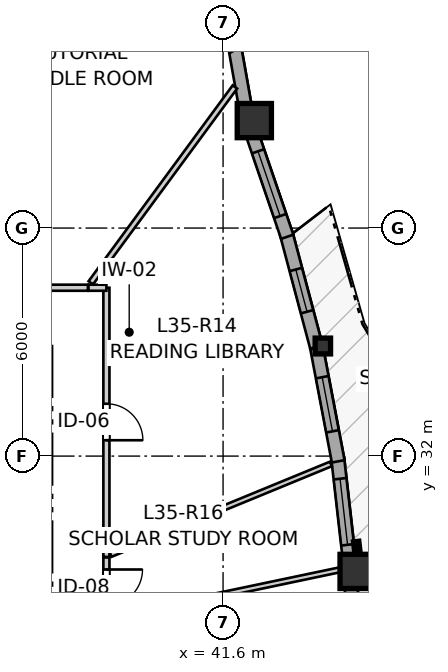
"""IFC4 building model, lengths in metres.
Left out: names, types, materials, properties, quantities, classifications, styles, units other than length and angle.
Written with IfcOpenShell. Run it as: python <this file> out.ifc"""

import sys

from ifc_helpers import new_model, si_unit, direction, frame, frame_2d, origin, origin_2d, place, context, subcontext, project, spatial, rectangle, i_section, extrude, source, transform, mapped, element, fill, save


model = new_model("IFC4")
c1 = context("Model", 3, precision=1e-05, world=origin(), true_north=direction((0.0, 1.0)))
c2 = subcontext(c1, "Body", "Model", "MODEL_VIEW")
j1 = project(units=[si_unit("LENGTHUNIT", "METRE"), si_unit("PLANEANGLEUNIT", "RADIAN")], contexts=[c1])
p1 = place(None, origin())
s1 = spatial("IfcSite", under=j1, at=p1, CompositionType="ELEMENT")
p2 = place(p1, origin())
s2 = spatial("IfcBuilding", under=s1, at=p2, CompositionType="ELEMENT")
p3 = place(p2, frame((0.0, 0.0, 118.4)))
s3 = spatial("IfcBuildingStorey", under=s2, at=p3, CompositionType="ELEMENT", Elevation=118.4)
m1 = source(origin(), c2, "Body", "SweptSolid", [
    extrude(rectangle(XDim=0.9, YDim=0.9, at=origin_2d()), origin(), (0.0, 0.0, 1.0), 2.95),
])
p4 = place(p3, frame((45.127, 28.966, 0.0), z_axis=(0.0, 0.0, 1.0), x_axis=(1.0, 0.0, 0.0)))
e1 = element("IfcColumn", 1, at=p4, inside=s3, PredefinedType="COLUMN", context=c2, shape_type="MappedRepresentation", body=[
    mapped(m1, transform((0.0, 0.0, 0.0), x_axis=(1.0, 0.0, 0.0), y_axis=(0.0, 1.0, 0.0), z_axis=(0.0, 0.0, 1.0), scale=1.0)),
])
m2 = source(origin(), c2, "Body", "SweptSolid", [
    extrude(i_section(OverallWidth=0.406, OverallDepth=0.416, WebThickness=0.027, FlangeThickness=0.044, FilletRadius=0.015, at=origin_2d()), origin(), (0.0, 0.0, 1.0), 2.95),
])
p5 = place(p3, frame((44.226, 34.896, 0.0), z_axis=(0.0, 0.0, 1.0), x_axis=(1.0, 0.0, 0.0)))
e2 = element("IfcColumn", 2, at=p5, inside=s3, PredefinedType="PILASTER", context=c2, shape_type="MappedRepresentation", body=[
    mapped(m2, transform((0.0, 0.0, 0.0), x_axis=(1.0, 0.0, 0.0), y_axis=(0.0, 1.0, 0.0), z_axis=(0.0, 0.0, 1.0), scale=1.0)),
])
p6 = place(p3, frame((42.423, 40.828, 0.0), z_axis=(0.0, 0.0, 1.0), x_axis=(1.0, 0.0, 0.0)))
e3 = element("IfcColumn", 3, at=p6, inside=s3, PredefinedType="COLUMN", context=c2, shape_type="MappedRepresentation", body=[
    mapped(m1, transform((0.0, 0.0, 0.0), x_axis=(1.0, 0.0, 0.0), y_axis=(0.0, 1.0, 0.0), z_axis=(0.0, 0.0, 1.0), scale=1.0)),
])
p7 = place(p3, frame((45.071, 25.956, 0.0), z_axis=(0.0, 0.0, 1.0), x_axis=(-0.037997361734, 0.999277839493, 0.0)))
e4 = element("IfcWall", 4, at=p7, inside=s3, PredefinedType="SOLIDWALL", context=c2, shape_type="SweptSolid", body=[
    extrude(rectangle(XDim=2.776, YDim=0.34, at=frame_2d((1.388, 0.0))), origin(), (0.0, 0.0, 1.0), 2.48),
])
p8 = place(p7, frame((0.771, 0.0, 0.82)))
e5 = element("IfcOpeningElement", 5, at=p8, cuts=e4, PredefinedType="OPENING", context=c2, shape_type="SweptSolid", body=[
    extrude(rectangle(XDim=1.45, YDim=1.25, at=frame_2d((0.725, 0.625))), frame((0.0, 0.18, 0.0), z_axis=(0.0, -1.0, 0.0), x_axis=(1.0, 0.0, 0.0)), (0.0, 0.0, 1.0), 0.36),
])
p9 = place(p3, frame((44.932, 29.175, 0.0), z_axis=(0.0, 0.0, 1.0), x_axis=(-0.113290188042, 0.993561942354, 0.0)))
e6 = element("IfcWall", 6, at=p9, inside=s3, PredefinedType="SOLIDWALL", context=c2, shape_type="SweptSolid", body=[
    extrude(rectangle(XDim=2.793, YDim=0.34, at=frame_2d((1.396, 0.0))), origin(), (0.0, 0.0, 1.0), 2.48),
])
p10 = place(p9, frame((0.493, 0.0, 0.82)))
e7 = element("IfcOpeningElement", 7, at=p10, cuts=e6, PredefinedType="OPENING", context=c2, shape_type="SweptSolid", body=[
    extrude(rectangle(XDim=1.75, YDim=1.3, at=frame_2d((0.875, 0.65))), frame((0.0, 0.18, 0.0), z_axis=(0.0, -1.0, 0.0), x_axis=(1.0, 0.0, 0.0)), (0.0, 0.0, 1.0), 0.36),
])
p11 = place(p3, frame((44.629, 31.862, 0.0), z_axis=(0.0, 0.0, 1.0), x_axis=(-0.186690909565, 0.982418701108, 0.0)))
e8 = element("IfcWall", 8, at=p11, inside=s3, PredefinedType="SOLIDWALL", context=c2, shape_type="SweptSolid", body=[
    extrude(rectangle(XDim=3.037, YDim=0.34, at=frame_2d((1.518, 0.0))), origin(), (0.0, 0.0, 1.0), 2.48),
])
p12 = place(p11, frame((0.803, 0.0, 0.82)))
e9 = element("IfcOpeningElement", 9, at=p12, cuts=e8, PredefinedType="OPENING", context=c2, shape_type="SweptSolid", body=[
    extrude(rectangle(XDim=1.45, YDim=1.25, at=frame_2d((0.725, 0.625))), frame((0.0, 0.18, 0.0), z_axis=(0.0, -1.0, 0.0), x_axis=(1.0, 0.0, 0.0)), (0.0, 0.0, 1.0), 0.36),
])
p13 = place(p3, frame((44.056, 34.872, 0.0), z_axis=(0.0, 0.0, 1.0), x_axis=(-0.257081647056, 0.966389686797, 0.0)))
e10 = element("IfcWall", 10, at=p13, inside=s3, PredefinedType="SOLIDWALL", context=c2, shape_type="SweptSolid", body=[
    extrude(rectangle(XDim=3.086, YDim=0.34, at=frame_2d((1.543, 0.0))), origin(), (0.0, 0.0, 1.0), 2.48),
])
p14 = place(p13, frame((0.958, 0.0, 0.82)))
e11 = element("IfcOpeningElement", 11, at=p14, cuts=e10, PredefinedType="OPENING", context=c2, shape_type="SweptSolid", body=[
    extrude(rectangle(XDim=1.15, YDim=1.2, at=frame_2d((0.575, 0.6))), frame((0.0, 0.18, 0.0), z_axis=(0.0, -1.0, 0.0), x_axis=(1.0, 0.0, 0.0)), (0.0, 0.0, 1.0), 0.36),
])
p15 = place(p3, frame((43.288, 37.771, 0.0), z_axis=(0.0, 0.0, 1.0), x_axis=(-0.323537149191, 0.94621546864, 0.0)))
e12 = element("IfcWall", 12, at=p15, inside=s3, PredefinedType="SOLIDWALL", context=c2, shape_type="SweptSolid", body=[
    extrude(rectangle(XDim=2.942, YDim=0.34, at=frame_2d((1.471, 0.0))), origin(), (0.0, 0.0, 1.0), 2.48),
])
p16 = place(p15, frame((0.576, 0.0, 0.82)))
e13 = element("IfcOpeningElement", 13, at=p16, cuts=e12, PredefinedType="OPENING", context=c2, shape_type="SweptSolid", body=[
    extrude(rectangle(XDim=1.8, YDim=1.45, at=frame_2d((0.9, 0.725))), frame((0.0, 0.18, 0.0), z_axis=(0.0, -1.0, 0.0), x_axis=(1.0, 0.0, 0.0)), (0.0, 0.0, 1.0), 0.36),
])
p17 = place(p3, frame((42.215, 41.024, 0.0), z_axis=(0.0, 0.0, 1.0), x_axis=(-0.17440141227, 0.984674640375, 0.0)))
e14 = element("IfcWall", 14, at=p17, inside=s3, PredefinedType="SOLIDWALL", context=c2, shape_type="SweptSolid", body=[
    extrude(rectangle(XDim=1.831, YDim=0.34, at=frame_2d((0.916, 0.0))), origin(), (0.0, 0.0, 1.0), 2.48),
])
p18 = place(p3, frame((41.942, 42.701, 0.0), z_axis=(0.0, 0.0, 1.0), x_axis=(-0.501902596059, 0.864924149315, 0.0)))
e15 = element("IfcWall", 15, at=p18, inside=s3, PredefinedType="SOLIDWALL", context=c2, shape_type="SweptSolid", body=[
    extrude(rectangle(XDim=2.099, YDim=0.34, at=frame_2d((1.049, 0.0))), origin(), (0.0, 0.0, 1.0), 2.48),
])
p19 = place(p18, frame((0.3, 0.0, 0.82)))
e16 = element("IfcOpeningElement", 16, at=p19, cuts=e15, PredefinedType="OPENING", context=c2, shape_type="SweptSolid", body=[
    extrude(rectangle(XDim=1.5, YDim=1.45, at=frame_2d((0.75, 0.725))), frame((0.0, 0.18, 0.0), z_axis=(0.0, -1.0, 0.0), x_axis=(1.0, 0.0, 0.0)), (0.0, 0.0, 1.0), 0.36),
])
p20 = place(p3, frame((38.53, 36.43, 0.0), z_axis=(0.0, 0.0, 1.0), x_axis=(0.0, -1.0, 0.0)))
e17 = element("IfcWall", 17, at=p20, inside=s3, PredefinedType="PARTITIONING", context=c2, shape_type="SweptSolid", body=[
    extrude(rectangle(XDim=7.083, YDim=0.16, at=frame_2d((3.542, 0.0))), origin(), (0.0, 0.0, 1.0), 2.588),
])
p21 = place(p20, frame((3.053, 0.0, 0.0)))
e18 = element("IfcOpeningElement", 18, at=p21, cuts=e17, PredefinedType="OPENING", context=c2, shape_type="SweptSolid", body=[
    extrude(rectangle(XDim=0.96, YDim=2.1, at=frame_2d((0.48, 1.05))), frame((0.0, 0.09, 0.0), z_axis=(0.0, -1.0, 0.0), x_axis=(1.0, 0.0, 0.0)), (0.0, 0.0, 1.0), 0.18),
])
p22 = place(p3, frame((32.925, 36.43, 0.0), z_axis=(0.0, 0.0, 1.0), x_axis=(1.0, 0.0, 0.0)))
e19 = element("IfcWall", 19, at=p22, inside=s3, PredefinedType="PARTITIONING", context=c2, shape_type="SweptSolid", body=[
    extrude(rectangle(XDim=5.118, YDim=0.16, at=frame_2d((2.559, 0.0))), origin(), (0.0, 0.0, 1.0), 2.588),
])
p23 = place(p22, frame((1.907, 0.0, 0.0)))
e20 = element("IfcOpeningElement", 20, at=p23, cuts=e19, PredefinedType="OPENING", context=c2, shape_type="SweptSolid", body=[
    extrude(rectangle(XDim=1.3, YDim=2.1, at=frame_2d((0.65, 1.05))), frame((0.0, 0.09, 0.0), z_axis=(0.0, -1.0, 0.0), x_axis=(1.0, 0.0, 0.0)), (0.0, 0.0, 1.0), 0.18),
])
p24 = place(p3, frame((38.53, 29.332, 0.0), z_axis=(0.0, 0.0, 1.0), x_axis=(0.0, -1.0, 0.0)))
e21 = element("IfcWall", 21, at=p24, inside=s3, PredefinedType="PARTITIONING", context=c2, shape_type="SweptSolid", body=[
    extrude(rectangle(XDim=1.629, YDim=0.16, at=frame_2d((0.814, 0.0))), origin(), (0.0, 0.0, 1.0), 2.95),
])
p25 = place(p24, frame((0.316, 0.0, 0.0)))
e22 = element("IfcOpeningElement", 22, at=p25, cuts=e21, PredefinedType="OPENING", context=c2, shape_type="SweptSolid", body=[
    extrude(rectangle(XDim=0.95, YDim=2.1, at=frame_2d((0.475, 1.05))), frame((0.0, 0.09, 0.0), z_axis=(0.0, -1.0, 0.0), x_axis=(1.0, 0.0, 0.0)), (0.0, 0.0, 1.0), 0.18),
])
p26 = place(p3, frame((38.119, 36.559, 0.0), z_axis=(0.0, 0.0, 1.0), x_axis=(0.592704345809, 0.805420113021, 0.0)))
e23 = element("IfcWall", 23, at=p26, inside=s3, PredefinedType="PARTITIONING", context=c2, shape_type="SweptSolid", body=[
    extrude(rectangle(XDim=6.399, YDim=0.145, at=frame_2d((3.199, 0.0))), origin(), (0.0, 0.0, 1.0), 2.95),
])
p27 = place(p3, frame((38.642, 29.41, 0.0), z_axis=(0.0, 0.0, 1.0), x_axis=(0.924865201518, 0.380295094659, 0.0)))
e24 = element("IfcWall", 24, at=p27, inside=s3, PredefinedType="PARTITIONING", context=c2, shape_type="SweptSolid", body=[
    extrude(rectangle(XDim=6.266, YDim=0.13, at=frame_2d((3.133, 0.0))), origin(), (0.0, 0.0, 1.0), 2.95),
])
p28 = place(p3, frame((38.631, 27.739, 0.0), z_axis=(0.0, 0.0, 1.0), x_axis=(0.978654667538, 0.205511658323, 0.0)))
e25 = element("IfcWall", 25, at=p28, inside=s3, PredefinedType="PARTITIONING", context=c2, shape_type="SweptSolid", body=[
    extrude(rectangle(XDim=6.29, YDim=0.13, at=frame_2d((3.145, 0.0))), origin(), (0.0, 0.0, 1.0), 2.368),
])
p29 = place(p3, frame((38.058, 36.43, 0.0), z_axis=(0.0, 0.0, 1.0), x_axis=(1.0, 0.0, 0.0)))
e26 = element("IfcWall", 26, at=p29, inside=s3, PredefinedType="PARTITIONING", context=c2, shape_type="SweptSolid", body=[
    extrude(rectangle(XDim=0.472, YDim=0.16, at=frame_2d((0.236, 0.0))), origin(), (0.0, 0.0, 1.0), 2.588),
])
m3 = source(origin(), c2, "Body", "SweptSolid", [
    extrude(rectangle(XDim=1.75, YDim=1.3, at=frame_2d((0.875, 0.65))), frame((0.0, 0.03, 0.0), z_axis=(0.0, -1.0, 0.0), x_axis=(1.0, 0.0, 0.0)), (0.0, 0.0, 1.0), 0.06),
])
p30 = place(p10, origin())
e27 = element("IfcWindow", 27, at=p30, inside=s3, PartitioningType="SINGLE_PANEL", PredefinedType="WINDOW", context=c2, shape_type="MappedRepresentation", body=[
    mapped(m3, transform((0.0, 0.0, 0.0), x_axis=(1.0, 0.0, 0.0), y_axis=(0.0, 1.0, 0.0), z_axis=(0.0, 0.0, 1.0), scale=1.0)),
])
fill(e7, e27)
m4 = source(origin(), c2, "Body", "SweptSolid", [
    extrude(rectangle(XDim=1.45, YDim=1.25, at=frame_2d((0.725, 0.625))), frame((0.0, 0.03, 0.0), z_axis=(0.0, -1.0, 0.0), x_axis=(1.0, 0.0, 0.0)), (0.0, 0.0, 1.0), 0.06),
])
p31 = place(p12, origin())
e28 = element("IfcWindow", 28, at=p31, inside=s3, PartitioningType="SINGLE_PANEL", PredefinedType="WINDOW", context=c2, shape_type="MappedRepresentation", body=[
    mapped(m4, transform((0.0, 0.0, 0.0), x_axis=(1.0, 0.0, 0.0), y_axis=(0.0, 1.0, 0.0), z_axis=(0.0, 0.0, 1.0), scale=1.0)),
])
fill(e9, e28)
m5 = source(origin(), c2, "Body", "SweptSolid", [
    extrude(rectangle(XDim=1.15, YDim=1.2, at=frame_2d((0.575, 0.6))), frame((0.0, 0.03, 0.0), z_axis=(0.0, -1.0, 0.0), x_axis=(1.0, 0.0, 0.0)), (0.0, 0.0, 1.0), 0.06),
])
p32 = place(p14, origin())
e29 = element("IfcWindow", 29, at=p32, inside=s3, PartitioningType="SINGLE_PANEL", PredefinedType="WINDOW", context=c2, shape_type="MappedRepresentation", body=[
    mapped(m5, transform((0.0, 0.0, 0.0), x_axis=(1.0, 0.0, 0.0), y_axis=(0.0, 1.0, 0.0), z_axis=(0.0, 0.0, 1.0), scale=1.0)),
])
fill(e11, e29)
m6 = source(origin(), c2, "Body", "SweptSolid", [
    extrude(rectangle(XDim=1.8, YDim=1.45, at=frame_2d((0.9, 0.725))), frame((0.0, 0.03, 0.0), z_axis=(0.0, -1.0, 0.0), x_axis=(1.0, 0.0, 0.0)), (0.0, 0.0, 1.0), 0.06),
])
p33 = place(p16, origin())
e30 = element("IfcWindow", 30, at=p33, inside=s3, PartitioningType="SINGLE_PANEL", PredefinedType="WINDOW", context=c2, shape_type="MappedRepresentation", body=[
    mapped(m6, transform((0.0, 0.0, 0.0), x_axis=(1.0, 0.0, 0.0), y_axis=(0.0, 1.0, 0.0), z_axis=(0.0, 0.0, 1.0), scale=1.0)),
])
fill(e13, e30)
m7 = source(origin(), c2, "Body", "SweptSolid", [
    extrude(rectangle(XDim=0.96, YDim=2.1, at=frame_2d((0.48, 1.05))), frame((0.0, 0.025, 0.0), z_axis=(0.0, -1.0, 0.0), x_axis=(1.0, 0.0, 0.0)), (0.0, 0.0, 1.0), 0.05),
])
p34 = place(p21, origin())
e31 = element("IfcDoor", 31, at=p34, inside=s3, OperationType="SINGLE_SWING_RIGHT", PredefinedType="DOOR", context=c2, shape_type="MappedRepresentation", body=[
    mapped(m7, transform((0.0, 0.0, 0.0), x_axis=(1.0, 0.0, 0.0), y_axis=(0.0, 1.0, 0.0), z_axis=(0.0, 0.0, 1.0), scale=1.0)),
])
fill(e18, e31)
m8 = source(origin(), c2, "Body", "SweptSolid", [
    extrude(rectangle(XDim=0.95, YDim=2.1, at=frame_2d((0.475, 1.05))), frame((0.0, 0.025, 0.0), z_axis=(0.0, -1.0, 0.0), x_axis=(1.0, 0.0, 0.0)), (0.0, 0.0, 1.0), 0.05),
])
p35 = place(p25, origin())
e32 = element("IfcDoor", 32, at=p35, inside=s3, OperationType="SINGLE_SWING_LEFT", PredefinedType="DOOR", context=c2, shape_type="MappedRepresentation", body=[
    mapped(m8, transform((0.0, 0.0, 0.0), x_axis=(1.0, 0.0, 0.0), y_axis=(0.0, 1.0, 0.0), z_axis=(0.0, 0.0, 1.0), scale=1.0)),
])
fill(e22, e32)
save(model, sys.argv[1])
